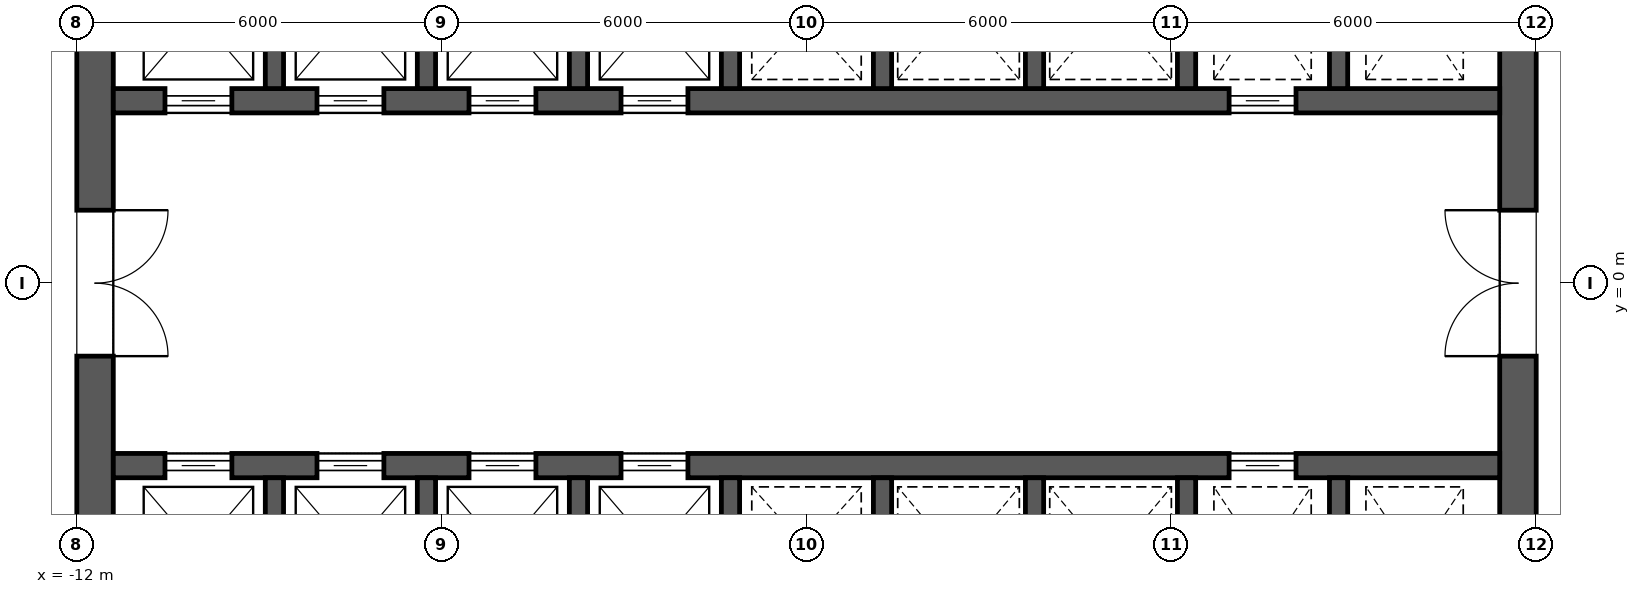
"""IFC4 building model, lengths in metres.
Left out: names, types, materials, properties, quantities, classifications, styles, units other than length and angle.
Written with IfcOpenShell. Run it as: python <this file> out.ifc"""

import sys

from ifc_helpers import new_model, si_unit, direction, frame, frame_2d, origin, place, context, subcontext, project, spatial, rectangle, extrude, element, fill, save


model = new_model("IFC4")
c1 = context("Model", 3, precision=1e-05, world=origin(), true_north=direction((0.0, 1.0)))
c2 = subcontext(c1, "Body", "Model", "MODEL_VIEW")
j1 = project(units=[si_unit("LENGTHUNIT", "METRE"), si_unit("PLANEANGLEUNIT", "RADIAN")], contexts=[c1])
p1 = place(None, origin())
s1 = spatial("IfcSite", under=j1, at=p1, CompositionType="ELEMENT")
p2 = place(p1, origin())
s2 = spatial("IfcBuilding", under=s1, at=p2, CompositionType="ELEMENT")
p3 = place(p2, frame((0.0, 0.0, 82.3)))
s3 = spatial("IfcBuildingStorey", under=s2, at=p3, CompositionType="ELEMENT", Elevation=82.3)
p4 = place(p3, frame((11.7, -11.4, 0.0), z_axis=(0.0, 0.0, 1.0), x_axis=(0.0, 1.0, 0.0)))
e1 = element("IfcWall", 1, at=p4, inside=s3, PredefinedType="SHEAR", context=c2, shape_type="SweptSolid", body=[
    extrude(rectangle(XDim=22.8, YDim=0.6, at=frame_2d((11.4, 0.0))), origin(), (0.0, 0.0, 1.0), 4.2),
])
p5 = place(p4, frame((10.2, 0.0, 0.0)))
e2 = element("IfcOpeningElement", 2, at=p5, cuts=e1, PredefinedType="OPENING", context=c2, shape_type="SweptSolid", body=[
    extrude(rectangle(XDim=2.4, YDim=2.1, at=frame_2d((1.2, 1.05))), frame((0.0, 0.312, 0.0), z_axis=(0.0, -1.0, 0.0), x_axis=(1.0, 0.0, 0.0)), (0.0, 0.0, 1.0), 0.624),
])
p6 = place(p4, frame((19.5, 0.0, 0.0)))
e3 = element("IfcOpeningElement", 3, at=p6, cuts=e1, PredefinedType="OPENING", context=c2, shape_type="SweptSolid", body=[
    extrude(rectangle(XDim=1.2, YDim=2.1, at=frame_2d((0.6, 1.05))), frame((0.0, 0.312, 0.0), z_axis=(0.0, -1.0, 0.0), x_axis=(1.0, 0.0, 0.0)), (0.0, 0.0, 1.0), 0.624),
])
p7 = place(p4, frame((2.1, 0.0, 0.0)))
e4 = element("IfcOpeningElement", 4, at=p7, cuts=e1, PredefinedType="OPENING", context=c2, shape_type="SweptSolid", body=[
    extrude(rectangle(XDim=1.2, YDim=2.1, at=frame_2d((0.6, 1.05))), frame((0.0, 0.312, 0.0), z_axis=(0.0, -1.0, 0.0), x_axis=(1.0, 0.0, 0.0)), (0.0, 0.0, 1.0), 0.624),
])
p8 = place(p3, frame((-11.7, -11.4, 0.0), z_axis=(0.0, 0.0, 1.0), x_axis=(0.0, 1.0, 0.0)))
e5 = element("IfcWall", 5, at=p8, inside=s3, PredefinedType="SHEAR", context=c2, shape_type="SweptSolid", body=[
    extrude(rectangle(XDim=22.8, YDim=0.6, at=frame_2d((11.4, 0.0))), origin(), (0.0, 0.0, 1.0), 4.2),
])
p9 = place(p8, frame((10.2, 0.0, 0.0)))
e6 = element("IfcOpeningElement", 6, at=p9, cuts=e5, PredefinedType="OPENING", context=c2, shape_type="SweptSolid", body=[
    extrude(rectangle(XDim=2.4, YDim=2.1, at=frame_2d((1.2, 1.05))), frame((0.0, 0.312, 0.0), z_axis=(0.0, -1.0, 0.0), x_axis=(1.0, 0.0, 0.0)), (0.0, 0.0, 1.0), 0.624),
])
p10 = place(p8, frame((18.925, 0.0, 0.0)))
e7 = element("IfcOpeningElement", 7, at=p10, cuts=e5, PredefinedType="OPENING", context=c2, shape_type="SweptSolid", body=[
    extrude(rectangle(XDim=1.2, YDim=2.1, at=frame_2d((0.6, 1.05))), frame((0.0, 0.312, 0.0), z_axis=(0.0, -1.0, 0.0), x_axis=(1.0, 0.0, 0.0)), (0.0, 0.0, 1.0), 0.624),
])
p11 = place(p8, frame((2.675, 0.0, 0.0)))
e8 = element("IfcOpeningElement", 8, at=p11, cuts=e5, PredefinedType="OPENING", context=c2, shape_type="SweptSolid", body=[
    extrude(rectangle(XDim=1.2, YDim=2.1, at=frame_2d((0.6, 1.05))), frame((0.0, 0.312, 0.0), z_axis=(0.0, -1.0, 0.0), x_axis=(1.0, 0.0, 0.0)), (0.0, 0.0, 1.0), 0.624),
])
p12 = place(p3, frame((-11.4, 3.0, 0.0), z_axis=(0.0, 0.0, 1.0), x_axis=(1.0, 0.0, 0.0)))
e9 = element("IfcWall", 9, at=p12, inside=s3, PredefinedType="SHEAR", context=c2, shape_type="SweptSolid", body=[
    extrude(rectangle(XDim=22.8, YDim=0.4, at=frame_2d((11.4, 0.0))), origin(), (0.0, 0.0, 1.0), 4.2),
])
p13 = place(p12, frame((0.85, 0.0, 0.0)))
e10 = element("IfcOpeningElement", 10, at=p13, cuts=e9, PredefinedType="OPENING", context=c2, shape_type="SweptSolid", body=[
    extrude(rectangle(XDim=1.1, YDim=2.1, at=frame_2d((0.55, 1.05))), frame((0.0, 0.212, 0.0), z_axis=(0.0, -1.0, 0.0), x_axis=(1.0, 0.0, 0.0)), (0.0, 0.0, 1.0), 0.424),
])
p14 = place(p12, frame((3.35, 0.0, 0.0)))
e11 = element("IfcOpeningElement", 11, at=p14, cuts=e9, PredefinedType="OPENING", context=c2, shape_type="SweptSolid", body=[
    extrude(rectangle(XDim=1.1, YDim=2.1, at=frame_2d((0.55, 1.05))), frame((0.0, 0.212, 0.0), z_axis=(0.0, -1.0, 0.0), x_axis=(1.0, 0.0, 0.0)), (0.0, 0.0, 1.0), 0.424),
])
p15 = place(p12, frame((5.85, 0.0, 0.0)))
e12 = element("IfcOpeningElement", 12, at=p15, cuts=e9, PredefinedType="OPENING", context=c2, shape_type="SweptSolid", body=[
    extrude(rectangle(XDim=1.1, YDim=2.1, at=frame_2d((0.55, 1.05))), frame((0.0, 0.212, 0.0), z_axis=(0.0, -1.0, 0.0), x_axis=(1.0, 0.0, 0.0)), (0.0, 0.0, 1.0), 0.424),
])
p16 = place(p12, frame((8.35, 0.0, 0.0)))
e13 = element("IfcOpeningElement", 13, at=p16, cuts=e9, PredefinedType="OPENING", context=c2, shape_type="SweptSolid", body=[
    extrude(rectangle(XDim=1.1, YDim=2.1, at=frame_2d((0.55, 1.05))), frame((0.0, 0.212, 0.0), z_axis=(0.0, -1.0, 0.0), x_axis=(1.0, 0.0, 0.0)), (0.0, 0.0, 1.0), 0.424),
])
p17 = place(p12, frame((18.35, 0.0, 0.0)))
e14 = element("IfcOpeningElement", 14, at=p17, cuts=e9, PredefinedType="OPENING", context=c2, shape_type="SweptSolid", body=[
    extrude(rectangle(XDim=1.1, YDim=2.1, at=frame_2d((0.55, 1.05))), frame((0.0, 0.212, 0.0), z_axis=(0.0, -1.0, 0.0), x_axis=(1.0, 0.0, 0.0)), (0.0, 0.0, 1.0), 0.424),
])
for number, where, z_axis, x_axis in (
    (15, (-8.75, 3.2, 0.0), (0.0, 0.0, 1.0), (0.0, 1.0, 0.0)),
    (16, (-6.25, 3.2, 0.0), (0.0, 0.0, 1.0), (0.0, 1.0, 0.0)),
    (17, (-3.75, 3.2, 0.0), (0.0, 0.0, 1.0), (0.0, 1.0, 0.0)),
    (18, (-1.25, 3.2, 0.0), (0.0, 0.0, 1.0), (0.0, 1.0, 0.0)),
    (19, (1.25, 3.2, 0.0), (0.0, 0.0, 1.0), (0.0, 1.0, 0.0)),
    (20, (3.75, 3.2, 0.0), (0.0, 0.0, 1.0), (0.0, 1.0, 0.0)),
    (21, (6.25, 3.2, 0.0), (0.0, 0.0, 1.0), (0.0, 1.0, 0.0)),
    (22, (8.75, 3.2, 0.0), (0.0, 0.0, 1.0), (0.0, 1.0, 0.0)),
):
    element("IfcWall", number, at=place(p3, frame(where, z_axis=z_axis, x_axis=x_axis)), inside=s3, PredefinedType="SHEAR", context=c2, shape_type="SweptSolid", body=[
        extrude(rectangle(XDim=2.9, YDim=0.3, at=frame_2d((1.45, 0.0))), origin(), (0.0, 0.0, 1.0), 4.2),
    ])
p18 = place(p3, frame((-11.4, -3.0, 0.0), z_axis=(0.0, 0.0, 1.0), x_axis=(1.0, 0.0, 0.0)))
e23 = element("IfcWall", 23, at=p18, inside=s3, PredefinedType="SHEAR", context=c2, shape_type="SweptSolid", body=[
    extrude(rectangle(XDim=22.8, YDim=0.4, at=frame_2d((11.4, 0.0))), origin(), (0.0, 0.0, 1.0), 4.2),
])
p19 = place(p18, frame((0.85, 0.0, 0.0)))
e24 = element("IfcOpeningElement", 24, at=p19, cuts=e23, PredefinedType="OPENING", context=c2, shape_type="SweptSolid", body=[
    extrude(rectangle(XDim=1.1, YDim=2.1, at=frame_2d((0.55, 1.05))), frame((0.0, 0.212, 0.0), z_axis=(0.0, -1.0, 0.0), x_axis=(1.0, 0.0, 0.0)), (0.0, 0.0, 1.0), 0.424),
])
p20 = place(p18, frame((3.35, 0.0, 0.0)))
e25 = element("IfcOpeningElement", 25, at=p20, cuts=e23, PredefinedType="OPENING", context=c2, shape_type="SweptSolid", body=[
    extrude(rectangle(XDim=1.1, YDim=2.1, at=frame_2d((0.55, 1.05))), frame((0.0, 0.212, 0.0), z_axis=(0.0, -1.0, 0.0), x_axis=(1.0, 0.0, 0.0)), (0.0, 0.0, 1.0), 0.424),
])
p21 = place(p18, frame((5.85, 0.0, 0.0)))
e26 = element("IfcOpeningElement", 26, at=p21, cuts=e23, PredefinedType="OPENING", context=c2, shape_type="SweptSolid", body=[
    extrude(rectangle(XDim=1.1, YDim=2.1, at=frame_2d((0.55, 1.05))), frame((0.0, 0.212, 0.0), z_axis=(0.0, -1.0, 0.0), x_axis=(1.0, 0.0, 0.0)), (0.0, 0.0, 1.0), 0.424),
])
p22 = place(p18, frame((8.35, 0.0, 0.0)))
e27 = element("IfcOpeningElement", 27, at=p22, cuts=e23, PredefinedType="OPENING", context=c2, shape_type="SweptSolid", body=[
    extrude(rectangle(XDim=1.1, YDim=2.1, at=frame_2d((0.55, 1.05))), frame((0.0, 0.212, 0.0), z_axis=(0.0, -1.0, 0.0), x_axis=(1.0, 0.0, 0.0)), (0.0, 0.0, 1.0), 0.424),
])
p23 = place(p18, frame((18.35, 0.0, 0.0)))
e28 = element("IfcOpeningElement", 28, at=p23, cuts=e23, PredefinedType="OPENING", context=c2, shape_type="SweptSolid", body=[
    extrude(rectangle(XDim=1.1, YDim=2.1, at=frame_2d((0.55, 1.05))), frame((0.0, 0.212, 0.0), z_axis=(0.0, -1.0, 0.0), x_axis=(1.0, 0.0, 0.0)), (0.0, 0.0, 1.0), 0.424),
])
for number, where, z_axis, x_axis in (
    (29, (-8.75, -6.1, 0.0), (0.0, 0.0, 1.0), (0.0, 1.0, 0.0)),
    (30, (-6.25, -6.1, 0.0), (0.0, 0.0, 1.0), (0.0, 1.0, 0.0)),
    (31, (-3.75, -6.1, 0.0), (0.0, 0.0, 1.0), (0.0, 1.0, 0.0)),
    (32, (-1.25, -6.1, 0.0), (0.0, 0.0, 1.0), (0.0, 1.0, 0.0)),
    (33, (1.25, -6.1, 0.0), (0.0, 0.0, 1.0), (0.0, 1.0, 0.0)),
    (34, (3.75, -6.1, 0.0), (0.0, 0.0, 1.0), (0.0, 1.0, 0.0)),
    (35, (6.25, -6.1, 0.0), (0.0, 0.0, 1.0), (0.0, 1.0, 0.0)),
    (36, (8.75, -6.1, 0.0), (0.0, 0.0, 1.0), (0.0, 1.0, 0.0)),
):
    element("IfcWall", number, at=place(p3, frame(where, z_axis=z_axis, x_axis=x_axis)), inside=s3, PredefinedType="SHEAR", context=c2, shape_type="SweptSolid", body=[
        extrude(rectangle(XDim=2.9, YDim=0.3, at=frame_2d((1.45, 0.0))), origin(), (0.0, 0.0, 1.0), 4.2),
    ])
p24 = place(p13, origin())
e37 = element("IfcDoor", 37, at=p24, inside=s3, OperationType="SLIDING_TO_LEFT", PredefinedType="DOOR", context=c2, shape_type="SweptSolid", body=[
    extrude(rectangle(XDim=1.1, YDim=2.1, at=frame_2d((0.55, 1.05))), frame((0.0, 0.025, 0.0), z_axis=(0.0, -1.0, 0.0), x_axis=(1.0, 0.0, 0.0)), (0.0, 0.0, 1.0), 0.05),
])
fill(e10, e37)
p25 = place(p14, origin())
e38 = element("IfcDoor", 38, at=p25, inside=s3, OperationType="SLIDING_TO_LEFT", PredefinedType="DOOR", context=c2, shape_type="SweptSolid", body=[
    extrude(rectangle(XDim=1.1, YDim=2.1, at=frame_2d((0.55, 1.05))), frame((0.0, 0.025, 0.0), z_axis=(0.0, -1.0, 0.0), x_axis=(1.0, 0.0, 0.0)), (0.0, 0.0, 1.0), 0.05),
])
fill(e11, e38)
p26 = place(p15, origin())
e39 = element("IfcDoor", 39, at=p26, inside=s3, OperationType="SLIDING_TO_LEFT", PredefinedType="DOOR", context=c2, shape_type="SweptSolid", body=[
    extrude(rectangle(XDim=1.1, YDim=2.1, at=frame_2d((0.55, 1.05))), frame((0.0, 0.025, 0.0), z_axis=(0.0, -1.0, 0.0), x_axis=(1.0, 0.0, 0.0)), (0.0, 0.0, 1.0), 0.05),
])
fill(e12, e39)
p27 = place(p16, origin())
e40 = element("IfcDoor", 40, at=p27, inside=s3, OperationType="SLIDING_TO_LEFT", PredefinedType="DOOR", context=c2, shape_type="SweptSolid", body=[
    extrude(rectangle(XDim=1.1, YDim=2.1, at=frame_2d((0.55, 1.05))), frame((0.0, 0.025, 0.0), z_axis=(0.0, -1.0, 0.0), x_axis=(1.0, 0.0, 0.0)), (0.0, 0.0, 1.0), 0.05),
])
fill(e13, e40)
p28 = place(p19, origin())
e41 = element("IfcDoor", 41, at=p28, inside=s3, OperationType="SLIDING_TO_LEFT", PredefinedType="DOOR", context=c2, shape_type="SweptSolid", body=[
    extrude(rectangle(XDim=1.1, YDim=2.1, at=frame_2d((0.55, 1.05))), frame((0.0, 0.025, 0.0), z_axis=(0.0, -1.0, 0.0), x_axis=(1.0, 0.0, 0.0)), (0.0, 0.0, 1.0), 0.05),
])
fill(e24, e41)
p29 = place(p20, origin())
e42 = element("IfcDoor", 42, at=p29, inside=s3, OperationType="SLIDING_TO_LEFT", PredefinedType="DOOR", context=c2, shape_type="SweptSolid", body=[
    extrude(rectangle(XDim=1.1, YDim=2.1, at=frame_2d((0.55, 1.05))), frame((0.0, 0.025, 0.0), z_axis=(0.0, -1.0, 0.0), x_axis=(1.0, 0.0, 0.0)), (0.0, 0.0, 1.0), 0.05),
])
fill(e25, e42)
p30 = place(p21, origin())
e43 = element("IfcDoor", 43, at=p30, inside=s3, OperationType="SLIDING_TO_LEFT", PredefinedType="DOOR", context=c2, shape_type="SweptSolid", body=[
    extrude(rectangle(XDim=1.1, YDim=2.1, at=frame_2d((0.55, 1.05))), frame((0.0, 0.025, 0.0), z_axis=(0.0, -1.0, 0.0), x_axis=(1.0, 0.0, 0.0)), (0.0, 0.0, 1.0), 0.05),
])
fill(e26, e43)
p31 = place(p22, origin())
e44 = element("IfcDoor", 44, at=p31, inside=s3, OperationType="SLIDING_TO_LEFT", PredefinedType="DOOR", context=c2, shape_type="SweptSolid", body=[
    extrude(rectangle(XDim=1.1, YDim=2.1, at=frame_2d((0.55, 1.05))), frame((0.0, 0.025, 0.0), z_axis=(0.0, -1.0, 0.0), x_axis=(1.0, 0.0, 0.0)), (0.0, 0.0, 1.0), 0.05),
])
fill(e27, e44)
p32 = place(p17, origin())
e45 = element("IfcDoor", 45, at=p32, inside=s3, OperationType="SLIDING_TO_LEFT", PredefinedType="DOOR", context=c2, shape_type="SweptSolid", body=[
    extrude(rectangle(XDim=1.1, YDim=2.1, at=frame_2d((0.55, 1.05))), frame((0.0, 0.025, 0.0), z_axis=(0.0, -1.0, 0.0), x_axis=(1.0, 0.0, 0.0)), (0.0, 0.0, 1.0), 0.05),
])
fill(e14, e45)
p33 = place(p23, origin())
e46 = element("IfcDoor", 46, at=p33, inside=s3, OperationType="SLIDING_TO_LEFT", PredefinedType="DOOR", context=c2, shape_type="SweptSolid", body=[
    extrude(rectangle(XDim=1.1, YDim=2.1, at=frame_2d((0.55, 1.05))), frame((0.0, 0.025, 0.0), z_axis=(0.0, -1.0, 0.0), x_axis=(1.0, 0.0, 0.0)), (0.0, 0.0, 1.0), 0.05),
])
fill(e28, e46)
p34 = place(p9, frame((2.4, 0.0, 0.0), z_axis=(0.0, 0.0, 1.0), x_axis=(-1.0, 0.0, 0.0)))
e47 = element("IfcDoor", 47, at=p34, inside=s3, OperationType="DOUBLE_DOOR_SINGLE_SWING", PredefinedType="DOOR", context=c2, shape_type="SweptSolid", body=[
    extrude(rectangle(XDim=2.4, YDim=2.1, at=frame_2d((1.2, 1.05))), frame((0.0, 0.025, 0.0), z_axis=(0.0, -1.0, 0.0), x_axis=(1.0, 0.0, 0.0)), (0.0, 0.0, 1.0), 0.05),
])
fill(e6, e47)
p35 = place(p5, origin())
e48 = element("IfcDoor", 48, at=p35, inside=s3, OperationType="DOUBLE_DOOR_SINGLE_SWING", PredefinedType="DOOR", context=c2, shape_type="SweptSolid", body=[
    extrude(rectangle(XDim=2.4, YDim=2.1, at=frame_2d((1.2, 1.05))), frame((0.0, 0.025, 0.0), z_axis=(0.0, -1.0, 0.0), x_axis=(1.0, 0.0, 0.0)), (0.0, 0.0, 1.0), 0.05),
])
fill(e2, e48)
save(model, sys.argv[1])
